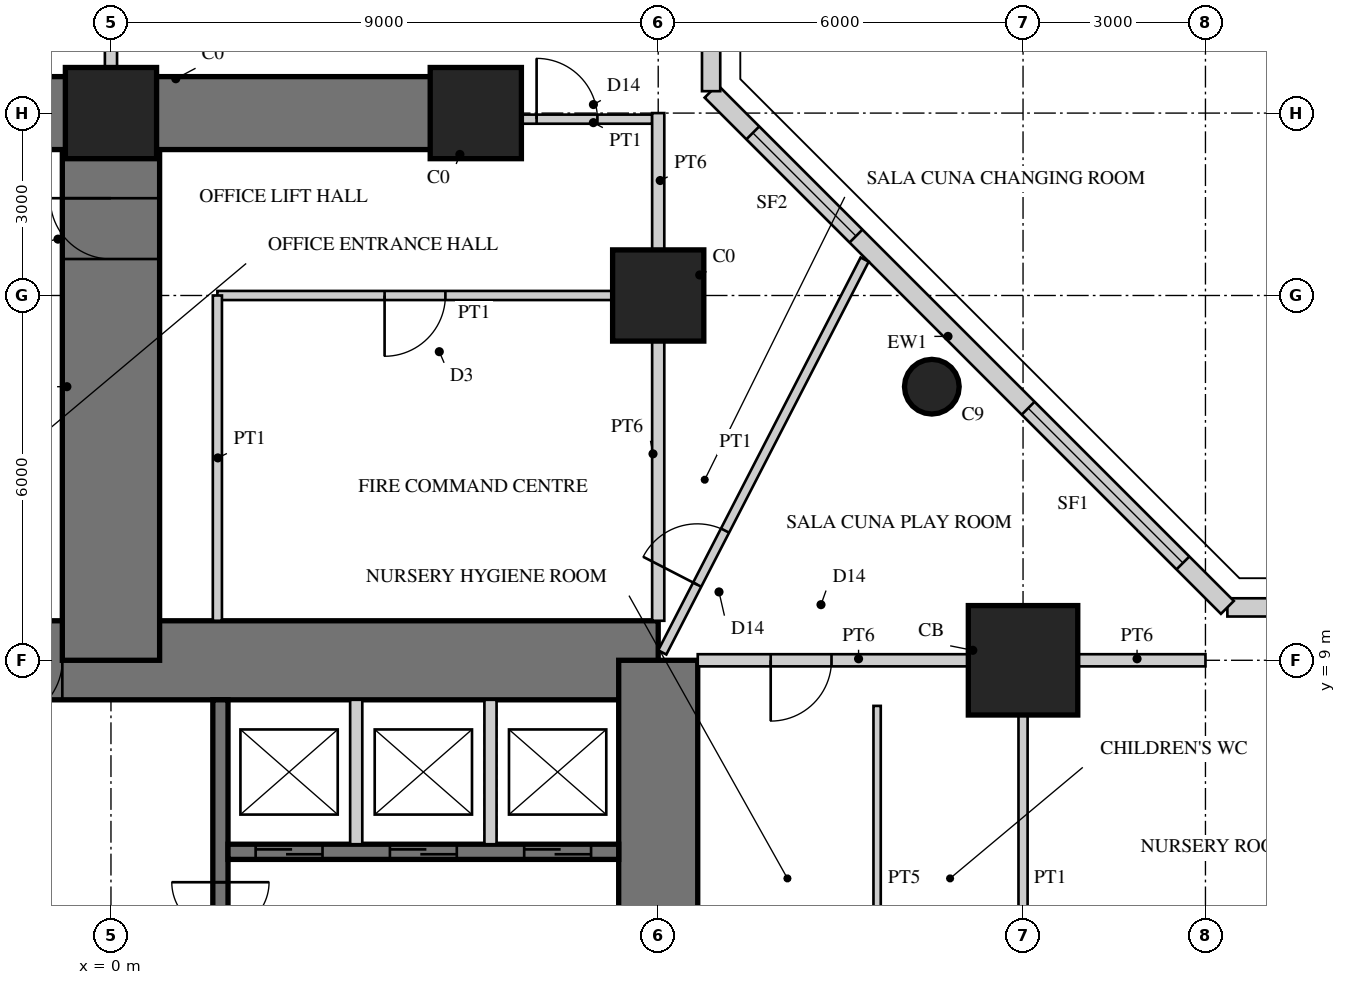
"""IFC4 building model, lengths in metres.
Left out: names, types, materials, properties, quantities, classifications, styles, units other than length and angle.
Written with IfcOpenShell. Run it as: python <this file> out.ifc"""

import sys

from ifc_helpers import new_model, si_unit, direction, frame, frame_2d, origin, origin_2d, place, context, subcontext, project, spatial, rectangle, hollow_rectangle, circle, extrude, element, fill, save


model = new_model("IFC4")
c1 = context("Model", 3, precision=1e-05, world=origin(), true_north=direction((0.0, 1.0)))
c2 = subcontext(c1, "Body", "Model", "MODEL_VIEW")
j1 = project(units=[si_unit("LENGTHUNIT", "METRE"), si_unit("PLANEANGLEUNIT", "RADIAN")], contexts=[c1])
p1 = place(None, origin())
s1 = spatial("IfcSite", under=j1, at=p1, CompositionType="ELEMENT")
p2 = place(p1, origin())
s2 = spatial("IfcBuilding", under=s1, at=p2, CompositionType="ELEMENT")
p3 = place(p2, origin())
s3 = spatial("IfcBuildingStorey", under=s2, at=p3, CompositionType="ELEMENT", Elevation=0.0)
p4 = place(p3, frame((9.0, 9.0, 0.0), z_axis=(0.0, 0.0, 1.0), x_axis=(-1.0, 0.0, 0.0)))
e1 = element("IfcWall", 1, at=p4, inside=s3, PredefinedType="SHEAR", context=c2, shape_type="SweptSolid", body=[
    extrude(rectangle(XDim=18.0, YDim=1.3, at=frame_2d((9.0, 0.0))), origin(), (0.0, 0.0, 1.0), 5.0),
])
p5 = place(p4, frame((9.8, 0.0, 0.0)))
e2 = element("IfcOpeningElement", 2, at=p5, cuts=e1, PredefinedType="OPENING", context=c2, shape_type="SweptSolid", body=[
    extrude(rectangle(XDim=1.0, YDim=2.4, at=frame_2d((0.5, 1.2))), frame((0.0, 0.66, 0.0), z_axis=(0.0, -1.0, 0.0), x_axis=(1.0, 0.0, 0.0)), (0.0, 0.0, 1.0), 1.32),
])
p6 = place(p3, frame((9.0, -9.0, 0.0), z_axis=(0.0, 0.0, 1.0), x_axis=(0.0, 1.0, 0.0)))
e3 = element("IfcWall", 3, at=p6, inside=s3, PredefinedType="SHEAR", context=c2, shape_type="SweptSolid", body=[
    extrude(rectangle(XDim=18.0, YDim=1.3, at=frame_2d((9.0, 0.0))), origin(), (0.0, 0.0, 1.0), 5.0),
])
p7 = place(p6, frame((9.8, 0.0, 0.0)))
e4 = element("IfcOpeningElement", 4, at=p7, cuts=e3, PredefinedType="OPENING", context=c2, shape_type="SweptSolid", body=[
    extrude(rectangle(XDim=1.0, YDim=2.4, at=frame_2d((0.5, 1.2))), frame((0.0, 0.66, 0.0), z_axis=(0.0, -1.0, 0.0), x_axis=(1.0, 0.0, 0.0)), (0.0, 0.0, 1.0), 1.32),
])
p8 = place(p3, frame((1.8, 1.875, 0.0), z_axis=(0.0, 0.0, 1.0), x_axis=(0.0, 1.0, 0.0)))
e5 = element("IfcWall", 5, at=p8, inside=s3, PredefinedType="SHEAR", context=c2, shape_type="SweptSolid", body=[
    extrude(rectangle(XDim=6.475, YDim=0.25, at=frame_2d((3.238, 0.0))), origin(), (0.0, 0.0, 1.0), 5.0),
])
p9 = place(p8, frame((1.875, 0.0, 0.0)))
e6 = element("IfcOpeningElement", 6, at=p9, cuts=e5, PredefinedType="OPENING", context=c2, shape_type="SweptSolid", body=[
    extrude(rectangle(XDim=1.6, YDim=2.4, at=frame_2d((0.8, 1.2))), frame((0.0, 0.135, 0.0), z_axis=(0.0, -1.0, 0.0), x_axis=(1.0, 0.0, 0.0)), (0.0, 0.0, 1.0), 0.27),
])
p10 = place(p3, frame((1.925, 5.85, 0.0), z_axis=(0.0, 0.0, 1.0), x_axis=(1.0, 0.0, 0.0)))
e7 = element("IfcWall", 7, at=p10, inside=s3, PredefinedType="SHEAR", context=c2, shape_type="SweptSolid", body=[
    extrude(rectangle(XDim=6.425, YDim=0.25, at=frame_2d((3.212, 0.0))), origin(), (0.0, 0.0, 1.0), 5.0),
])
p11 = place(p10, frame((0.454, 0.0, 0.0)))
e8 = element("IfcOpeningElement", 8, at=p11, cuts=e7, PredefinedType="OPENING", context=c2, shape_type="SweptSolid", body=[
    extrude(rectangle(XDim=1.1, YDim=2.2, at=frame_2d((0.55, 1.1))), frame((0.0, 0.135, 0.0), z_axis=(0.0, -1.0, 0.0), x_axis=(1.0, 0.0, 0.0)), (0.0, 0.0, 1.0), 0.27),
])
p12 = place(p10, frame((2.663, 0.0, 0.0)))
e9 = element("IfcOpeningElement", 9, at=p12, cuts=e7, PredefinedType="OPENING", context=c2, shape_type="SweptSolid", body=[
    extrude(rectangle(XDim=1.1, YDim=2.2, at=frame_2d((0.55, 1.1))), frame((0.0, 0.135, 0.0), z_axis=(0.0, -1.0, 0.0), x_axis=(1.0, 0.0, 0.0)), (0.0, 0.0, 1.0), 0.27),
])
p13 = place(p10, frame((4.871, 0.0, 0.0)))
e10 = element("IfcOpeningElement", 10, at=p13, cuts=e7, PredefinedType="OPENING", context=c2, shape_type="SweptSolid", body=[
    extrude(rectangle(XDim=1.1, YDim=2.2, at=frame_2d((0.55, 1.1))), frame((0.0, 0.135, 0.0), z_axis=(0.0, -1.0, 0.0), x_axis=(1.0, 0.0, 0.0)), (0.0, 0.0, 1.0), 0.27),
])
for number, where, z_axis, x_axis in (
    (11, (4.033, 5.975, 0.0), (0.0, 0.0, 1.0), (0.0, 1.0, 0.0)),
    (12, (6.242, 5.975, 0.0), (0.0, 0.0, 1.0), (0.0, 1.0, 0.0)),
):
    element("IfcWall", number, at=place(p3, frame(where, z_axis=z_axis, x_axis=x_axis)), inside=s3, PredefinedType="PARTITIONING", context=c2, shape_type="SweptSolid", body=[
        extrude(rectangle(XDim=2.375, YDim=0.2, at=frame_2d((1.188, 0.0))), origin(), (0.0, 0.0, 1.0), 5.0),
    ])
p14 = place(p3, frame((0.0, 9.0, 0.0), z_axis=(0.0, 0.0, 1.0), x_axis=(0.0, 1.0, 0.0)))
e13 = element("IfcWall", 13, at=p14, inside=s3, PredefinedType="SHEAR", context=c2, shape_type="SweptSolid", body=[
    extrude(rectangle(XDim=9.0, YDim=1.6, at=frame_2d((4.5, 0.0))), origin(), (0.0, 0.0, 1.0), 5.0),
])
p15 = place(p14, frame((6.6, 0.0, 0.0)))
e14 = element("IfcOpeningElement", 14, at=p15, cuts=e13, PredefinedType="OPENING", context=c2, shape_type="SweptSolid", body=[
    extrude(rectangle(XDim=1.0, YDim=2.2, at=frame_2d((0.5, 1.1))), frame((0.0, 0.81, 0.0), z_axis=(0.0, -1.0, 0.0), x_axis=(1.0, 0.0, 0.0)), (0.0, 0.0, 1.0), 1.62),
])
for number, where, z_axis, x_axis in (
    (15, (0.0, 18.0, 0.0), (0.0, 0.0, 1.0), (-1.0, 0.0, 0.0)),
    (16, (0.0, 18.0, 0.0), (0.0, 0.0, 1.0), (1.0, 0.0, 0.0)),
):
    element("IfcWall", number, at=place(p3, frame(where, z_axis=z_axis, x_axis=x_axis)), inside=s3, PredefinedType="SHEAR", context=c2, shape_type="SweptSolid", body=[
        extrude(rectangle(XDim=6.0, YDim=1.2, at=frame_2d((3.0, 0.0))), origin(), (0.0, 0.0, 1.0), 5.0),
    ])
p16 = place(p3, frame((9.0, 15.0, 0.0), z_axis=(0.0, 0.0, 1.0), x_axis=(1.0, 0.0, 0.0)))
e17 = element("IfcColumn", 17, at=p16, inside=s3, PredefinedType="COLUMN", context=c2, shape_type="SweptSolid", body=[
    extrude(rectangle(XDim=1.5, YDim=1.5, at=origin_2d()), origin(), (0.0, 0.0, 1.0), 5.0),
])
p17 = place(p3, frame((15.0, 9.0, 0.0), z_axis=(0.0, 0.0, 1.0), x_axis=(1.0, 0.0, 0.0)))
e18 = element("IfcColumn", 18, at=p17, inside=s3, PredefinedType="COLUMN", context=c2, shape_type="SweptSolid", body=[
    extrude(rectangle(XDim=1.8, YDim=1.8, at=origin_2d()), origin(), (0.0, 0.0, 1.0), 5.0),
])
for number, where, z_axis, x_axis in (
    (19, (6.0, 18.0, 0.0), (0.0, 0.0, 1.0), (1.0, 0.0, 0.0)),
    (20, (0.0, 18.0, 0.0), (0.0, 0.0, 1.0), (1.0, 0.0, 0.0)),
):
    element("IfcColumn", number, at=place(p3, frame(where, z_axis=z_axis, x_axis=x_axis)), inside=s3, PredefinedType="COLUMN", context=c2, shape_type="SweptSolid", body=[
        extrude(rectangle(XDim=1.5, YDim=1.5, at=origin_2d()), origin(), (0.0, 0.0, 1.0), 5.0),
    ])
p18 = place(p3, frame((13.5, 13.5, 0.0), z_axis=(0.0, 0.0, 1.0), x_axis=(1.0, 0.0, 0.0)))
e21 = element("IfcColumn", 21, at=p18, inside=s3, PredefinedType="COLUMN", context=c2, shape_type="SweptSolid", body=[
    extrude(circle(Radius=0.45, at=origin_2d()), origin(), (0.0, 0.0, 1.0), 5.0),
])
p19 = place(p3, frame((24.36, 9.87, 0.0), z_axis=(0.0, 0.0, 1.0), x_axis=(-1.0, 0.0, 0.0)))
e22 = element("IfcWall", 22, at=p19, inside=s3, PredefinedType="SOLIDWALL", context=c2, shape_type="SweptSolid", body=[
    extrude(rectangle(XDim=6.0, YDim=0.3, at=frame_2d((3.0, 0.0))), origin(), (0.0, 0.0, 1.0), 4.8),
])
p20 = place(p19, frame((1.635, 0.0, 0.3)))
e23 = element("IfcOpeningElement", 23, at=p20, cuts=e22, PredefinedType="OPENING", context=c2, shape_type="SweptSolid", body=[
    extrude(rectangle(XDim=1.2, YDim=3.9, at=frame_2d((0.6, 1.95))), frame((0.0, 0.16, 0.0), z_axis=(0.0, -1.0, 0.0), x_axis=(1.0, 0.0, 0.0)), (0.0, 0.0, 1.0), 0.32),
])
p21 = place(p19, frame((3.93, 0.0, 0.3)))
e24 = element("IfcOpeningElement", 24, at=p21, cuts=e22, PredefinedType="OPENING", context=c2, shape_type="SweptSolid", body=[
    extrude(rectangle(XDim=1.2, YDim=3.9, at=frame_2d((0.6, 1.95))), frame((0.0, 0.16, 0.0), z_axis=(0.0, -1.0, 0.0), x_axis=(1.0, 0.0, 0.0)), (0.0, 0.0, 1.0), 0.32),
])
p22 = place(p3, frame((18.36, 9.87, 0.0), z_axis=(0.0, 0.0, 1.0), x_axis=(-0.707106781187, 0.707106781187, 0.0)))
e25 = element("IfcWall", 25, at=p22, inside=s3, PredefinedType="SOLIDWALL", context=c2, shape_type="SweptSolid", body=[
    extrude(rectangle(XDim=12.007, YDim=0.3, at=frame_2d((6.003, 0.0))), origin(), (0.0, 0.0, 1.0), 4.8),
])
p23 = place(p22, frame((1.034, 0.0, 0.3)))
e26 = element("IfcOpeningElement", 26, at=p23, cuts=e25, PredefinedType="OPENING", context=c2, shape_type="SweptSolid", body=[
    extrude(rectangle(XDim=3.6, YDim=3.9, at=frame_2d((1.8, 1.95))), frame((0.0, 0.16, 0.0), z_axis=(0.0, -1.0, 0.0), x_axis=(1.0, 0.0, 0.0)), (0.0, 0.0, 1.0), 0.32),
])
p24 = place(p22, frame((8.637, 0.0, 0.3)))
e27 = element("IfcOpeningElement", 27, at=p24, cuts=e25, PredefinedType="OPENING", context=c2, shape_type="SweptSolid", body=[
    extrude(rectangle(XDim=2.4, YDim=3.9, at=frame_2d((1.2, 1.95))), frame((0.0, 0.16, 0.0), z_axis=(0.0, -1.0, 0.0), x_axis=(1.0, 0.0, 0.0)), (0.0, 0.0, 1.0), 0.32),
])
p25 = place(p3, frame((9.87, 18.36, 0.0), z_axis=(0.0, 0.0, 1.0), x_axis=(0.0, 1.0, 0.0)))
e28 = element("IfcWall", 28, at=p25, inside=s3, PredefinedType="SOLIDWALL", context=c2, shape_type="SweptSolid", body=[
    extrude(rectangle(XDim=6.0, YDim=0.3, at=frame_2d((3.0, 0.0))), origin(), (0.0, 0.0, 1.0), 4.8),
])
p26 = place(p25, frame((1.69, 0.0, 0.3)))
e29 = element("IfcOpeningElement", 29, at=p26, cuts=e28, PredefinedType="OPENING", context=c2, shape_type="SweptSolid", body=[
    extrude(rectangle(XDim=2.4, YDim=3.9, at=frame_2d((1.2, 1.95))), frame((0.0, 0.16, 0.0), z_axis=(0.0, -1.0, 0.0), x_axis=(1.0, 0.0, 0.0)), (0.0, 0.0, 1.0), 0.32),
])
p27 = place(p3, frame((8.25, 15.0, 0.0), z_axis=(0.0, 0.0, 1.0), x_axis=(-1.0, 0.0, 0.0)))
e30 = element("IfcWall", 30, at=p27, inside=s3, PredefinedType="PARTITIONING", context=c2, shape_type="SweptSolid", body=[
    extrude(rectangle(XDim=6.5, YDim=0.15, at=frame_2d((3.25, 0.0))), origin(), (0.0, 0.0, 1.0), 3.85),
])
p28 = place(p27, frame((2.75, 0.0, 0.0)))
e31 = element("IfcOpeningElement", 31, at=p28, cuts=e30, PredefinedType="OPENING", context=c2, shape_type="SweptSolid", body=[
    extrude(rectangle(XDim=1.0, YDim=2.1, at=frame_2d((0.5, 1.05))), frame((0.0, 0.085, 0.0), z_axis=(0.0, -1.0, 0.0), x_axis=(1.0, 0.0, 0.0)), (0.0, 0.0, 1.0), 0.17),
])
p29 = place(p3, frame((1.75, 9.65, 0.0), z_axis=(0.0, 0.0, 1.0), x_axis=(0.0, 1.0, 0.0)))
e32 = element("IfcWall", 32, at=p29, inside=s3, PredefinedType="PARTITIONING", context=c2, shape_type="SweptSolid", body=[
    extrude(rectangle(XDim=5.35, YDim=0.15, at=frame_2d((2.675, 0.0))), origin(), (0.0, 0.0, 1.0), 4.8),
])
p30 = place(p3, frame((6.75, 17.9, 0.0), z_axis=(0.0, 0.0, 1.0), x_axis=(1.0, 0.0, 0.0)))
e33 = element("IfcWall", 33, at=p30, inside=s3, PredefinedType="PARTITIONING", context=c2, shape_type="SweptSolid", body=[
    extrude(rectangle(XDim=2.15, YDim=0.15, at=frame_2d((1.075, 0.0))), origin(), (0.0, 0.0, 1.0), 3.85),
])
p31 = place(p30, frame((0.25, 0.0, 0.0)))
e34 = element("IfcOpeningElement", 34, at=p31, cuts=e33, PredefinedType="OPENING", context=c2, shape_type="SweptSolid", body=[
    extrude(rectangle(XDim=1.0, YDim=2.2, at=frame_2d((0.5, 1.1))), frame((0.0, 0.085, 0.0), z_axis=(0.0, -1.0, 0.0), x_axis=(1.0, 0.0, 0.0)), (0.0, 0.0, 1.0), 0.17),
])
p32 = place(p3, frame((15.0, 2.575, 0.0), z_axis=(0.0, 0.0, 1.0), x_axis=(0.0, 1.0, 0.0)))
e35 = element("IfcWall", 35, at=p32, inside=s3, PredefinedType="PARTITIONING", context=c2, shape_type="SweptSolid", body=[
    extrude(rectangle(XDim=5.675, YDim=0.15, at=frame_2d((2.837, 0.0))), origin(), (0.0, 0.0, 1.0), 3.85),
])
p33 = place(p3, frame((12.6, 2.575, 0.0), z_axis=(0.0, 0.0, 1.0), x_axis=(0.0, 1.0, 0.0)))
e36 = element("IfcWall", 36, at=p33, inside=s3, PredefinedType="PLUMBINGWALL", context=c2, shape_type="SweptSolid", body=[
    extrude(rectangle(XDim=5.675, YDim=0.12, at=frame_2d((2.837, 0.0))), origin(), (0.0, 0.0, 1.0), 4.8),
])
p34 = place(p3, frame((9.067, 9.129, 0.0), z_axis=(0.0, 0.0, 1.0), x_axis=(0.457956589674, 0.888974556427, 0.0)))
e37 = element("IfcWall", 37, at=p34, inside=s3, PredefinedType="PARTITIONING", context=c2, shape_type="SweptSolid", body=[
    extrude(rectangle(XDim=7.268, YDim=0.15, at=frame_2d((3.634, 0.0))), origin(), (0.0, 0.0, 1.0), 4.8),
])
p35 = place(p34, frame((1.254, 0.0, 0.0)))
e38 = element("IfcOpeningElement", 38, at=p35, cuts=e37, PredefinedType="OPENING", context=c2, shape_type="SweptSolid", body=[
    extrude(rectangle(XDim=1.0, YDim=2.2, at=frame_2d((0.5, 1.1))), frame((0.0, 0.085, 0.0), z_axis=(0.0, -1.0, 0.0), x_axis=(1.0, 0.0, 0.0)), (0.0, 0.0, 1.0), 0.17),
])
p36 = place(p3, frame((9.65, 9.0, 0.0), z_axis=(0.0, 0.0, 1.0), x_axis=(1.0, 0.0, 0.0)))
e39 = element("IfcWall", 39, at=p36, inside=s3, PredefinedType="SOLIDWALL", context=c2, shape_type="SweptSolid", body=[
    extrude(rectangle(XDim=4.6, YDim=0.2, at=frame_2d((2.3, 0.0))), origin(), (0.0, 0.0, 1.0), 3.8),
])
p37 = place(p36, frame((1.2, 0.0, 0.0)))
e40 = element("IfcOpeningElement", 40, at=p37, cuts=e39, PredefinedType="OPENING", context=c2, shape_type="SweptSolid", body=[
    extrude(rectangle(XDim=1.0, YDim=2.2, at=frame_2d((0.5, 1.1))), frame((0.0, 0.11, 0.0), z_axis=(0.0, -1.0, 0.0), x_axis=(1.0, 0.0, 0.0)), (0.0, 0.0, 1.0), 0.22),
])
p38 = place(p3, frame((15.75, 9.0, 0.0), z_axis=(0.0, 0.0, 1.0), x_axis=(1.0, 0.0, 0.0)))
e41 = element("IfcWall", 41, at=p38, inside=s3, PredefinedType="SOLIDWALL", context=c2, shape_type="SweptSolid", body=[
    extrude(rectangle(XDim=2.25, YDim=0.2, at=frame_2d((1.125, 0.0))), origin(), (0.0, 0.0, 1.0), 3.8),
])
p39 = place(p3, frame((9.0, 14.25, 0.0), z_axis=(0.0, 0.0, 1.0), x_axis=(0.0, -1.0, 0.0)))
e42 = element("IfcWall", 42, at=p39, inside=s3, PredefinedType="SOLIDWALL", context=c2, shape_type="SweptSolid", body=[
    extrude(rectangle(XDim=4.6, YDim=0.2, at=frame_2d((2.3, 0.0))), origin(), (0.0, 0.0, 1.0), 3.8),
])
p40 = place(p3, frame((9.0, 18.0, 0.0), z_axis=(0.0, 0.0, 1.0), x_axis=(0.0, -1.0, 0.0)))
e43 = element("IfcWall", 43, at=p40, inside=s3, PredefinedType="SOLIDWALL", context=c2, shape_type="SweptSolid", body=[
    extrude(rectangle(XDim=2.25, YDim=0.2, at=frame_2d((1.125, 0.0))), origin(), (0.0, 0.0, 1.0), 3.8),
])
p41 = place(p3, frame((0.0, 18.0, 0.0), z_axis=(0.0, 0.0, 1.0), x_axis=(0.0, 1.0, 0.0)))
e44 = element("IfcWall", 44, at=p41, inside=s3, PredefinedType="SOLIDWALL", context=c2, shape_type="SweptSolid", body=[
    extrude(rectangle(XDim=3.0, YDim=0.2, at=frame_2d((1.5, 0.0))), origin(), (0.0, 0.0, 1.0), 4.8),
])
p42 = place(p41, frame((1.05, 0.0, 0.0)))
e45 = element("IfcOpeningElement", 45, at=p42, cuts=e44, PredefinedType="OPENING", context=c2, shape_type="SweptSolid", body=[
    extrude(rectangle(XDim=1.0, YDim=2.2, at=frame_2d((0.5, 1.1))), frame((0.0, 0.11, 0.0), z_axis=(0.0, -1.0, 0.0), x_axis=(1.0, 0.0, 0.0)), (0.0, 0.0, 1.0), 0.22),
])
p43 = place(p23, origin())
e46 = element("IfcWindow", 46, at=p43, inside=s3, PartitioningType="SINGLE_PANEL", PredefinedType="WINDOW", context=c2, shape_type="SweptSolid", body=[
    extrude(hollow_rectangle(XDim=3.6, YDim=3.9, WallThickness=0.06, at=frame_2d((1.8, 1.95))), frame((0.0, 0.03, 0.0), z_axis=(0.0, -1.0, 0.0), x_axis=(1.0, 0.0, 0.0)), (0.0, 0.0, 1.0), 0.06),
    extrude(rectangle(XDim=3.479, YDim=3.779, at=frame_2d((1.8, 1.95))), frame((0.0, 0.03, 0.0), z_axis=(0.0, -1.0, 0.0), x_axis=(1.0, 0.0, 0.0)), (0.0, 0.0, 1.0), 0.06),
])
fill(e26, e46)
p44 = place(p24, origin())
e47 = element("IfcWindow", 47, at=p44, inside=s3, PartitioningType="SINGLE_PANEL", PredefinedType="WINDOW", context=c2, shape_type="SweptSolid", body=[
    extrude(hollow_rectangle(XDim=2.4, YDim=3.9, WallThickness=0.06, at=frame_2d((1.2, 1.95))), frame((0.0, 0.03, 0.0), z_axis=(0.0, -1.0, 0.0), x_axis=(1.0, 0.0, 0.0)), (0.0, 0.0, 1.0), 0.06),
    extrude(rectangle(XDim=2.279, YDim=3.779, at=frame_2d((1.2, 1.95))), frame((0.0, 0.03, 0.0), z_axis=(0.0, -1.0, 0.0), x_axis=(1.0, 0.0, 0.0)), (0.0, 0.0, 1.0), 0.06),
])
fill(e27, e47)
p45 = place(p28, origin())
e48 = element("IfcDoor", 48, at=p45, inside=s3, OperationType="SINGLE_SWING_RIGHT", PredefinedType="DOOR", context=c2, shape_type="SweptSolid", body=[
    extrude(rectangle(XDim=1.0, YDim=2.1, at=frame_2d((0.5, 1.05))), frame((0.0, 0.025, 0.0), z_axis=(0.0, -1.0, 0.0), x_axis=(1.0, 0.0, 0.0)), (0.0, 0.0, 1.0), 0.05),
])
fill(e31, e48)
p46 = place(p31, origin())
e49 = element("IfcDoor", 49, at=p46, inside=s3, OperationType="SINGLE_SWING_LEFT", PredefinedType="DOOR", context=c2, shape_type="SweptSolid", body=[
    extrude(rectangle(XDim=1.0, YDim=2.2, at=frame_2d((0.5, 1.1))), frame((0.0, 0.025, 0.0), z_axis=(0.0, -1.0, 0.0), x_axis=(1.0, 0.0, 0.0)), (0.0, 0.0, 1.0), 0.05),
])
fill(e34, e49)
p47 = place(p35, origin())
e50 = element("IfcDoor", 50, at=p47, inside=s3, OperationType="SINGLE_SWING_LEFT", PredefinedType="DOOR", context=c2, shape_type="SweptSolid", body=[
    extrude(rectangle(XDim=1.0, YDim=2.2, at=frame_2d((0.5, 1.1))), frame((0.0, 0.025, 0.0), z_axis=(0.0, -1.0, 0.0), x_axis=(1.0, 0.0, 0.0)), (0.0, 0.0, 1.0), 0.05),
])
fill(e38, e50)
p48 = place(p37, frame((1.0, 0.0, 0.0), z_axis=(0.0, 0.0, 1.0), x_axis=(-1.0, 0.0, 0.0)))
e51 = element("IfcDoor", 51, at=p48, inside=s3, OperationType="SINGLE_SWING_RIGHT", PredefinedType="DOOR", context=c2, shape_type="SweptSolid", body=[
    extrude(rectangle(XDim=1.0, YDim=2.2, at=frame_2d((0.5, 1.1))), frame((0.0, 0.025, 0.0), z_axis=(0.0, -1.0, 0.0), x_axis=(1.0, 0.0, 0.0)), (0.0, 0.0, 1.0), 0.05),
])
fill(e40, e51)
p49 = place(p15, origin())
e52 = element("IfcDoor", 52, at=p49, inside=s3, OperationType="SINGLE_SWING_RIGHT", PredefinedType="DOOR", context=c2, shape_type="SweptSolid", body=[
    extrude(rectangle(XDim=1.0, YDim=2.2, at=frame_2d((0.5, 1.1))), frame((0.0, 0.025, 0.0), z_axis=(0.0, -1.0, 0.0), x_axis=(1.0, 0.0, 0.0)), (0.0, 0.0, 1.0), 0.05),
])
fill(e14, e52)
p50 = place(p5, origin())
e53 = element("IfcDoor", 53, at=p50, inside=s3, OperationType="SINGLE_SWING_RIGHT", PredefinedType="DOOR", context=c2, shape_type="SweptSolid", body=[
    extrude(rectangle(XDim=1.0, YDim=2.4, at=frame_2d((0.5, 1.2))), frame((0.0, 0.055, 0.0), z_axis=(0.0, -1.0, 0.0), x_axis=(1.0, 0.0, 0.0)), (0.0, 0.0, 1.0), 0.05),
])
fill(e2, e53)
p51 = place(p11, origin())
e54 = element("IfcDoor", 54, at=p51, inside=s3, OperationType="DOUBLE_DOOR_SLIDING", PredefinedType="DOOR", context=c2, shape_type="SweptSolid", body=[
    extrude(rectangle(XDim=1.1, YDim=2.2, at=frame_2d((0.55, 1.1))), frame((0.0, 0.025, 0.0), z_axis=(0.0, -1.0, 0.0), x_axis=(1.0, 0.0, 0.0)), (0.0, 0.0, 1.0), 0.05),
])
fill(e8, e54)
p52 = place(p12, origin())
e55 = element("IfcDoor", 55, at=p52, inside=s3, OperationType="DOUBLE_DOOR_SLIDING", PredefinedType="DOOR", context=c2, shape_type="SweptSolid", body=[
    extrude(rectangle(XDim=1.1, YDim=2.2, at=frame_2d((0.55, 1.1))), frame((0.0, 0.025, 0.0), z_axis=(0.0, -1.0, 0.0), x_axis=(1.0, 0.0, 0.0)), (0.0, 0.0, 1.0), 0.05),
])
fill(e9, e55)
p53 = place(p13, origin())
e56 = element("IfcDoor", 56, at=p53, inside=s3, OperationType="DOUBLE_DOOR_SLIDING", PredefinedType="DOOR", context=c2, shape_type="SweptSolid", body=[
    extrude(rectangle(XDim=1.1, YDim=2.2, at=frame_2d((0.55, 1.1))), frame((0.0, 0.025, 0.0), z_axis=(0.0, -1.0, 0.0), x_axis=(1.0, 0.0, 0.0)), (0.0, 0.0, 1.0), 0.05),
])
fill(e10, e56)
p54 = place(p9, origin())
e57 = element("IfcDoor", 57, at=p54, inside=s3, OperationType="DOUBLE_DOOR_DOUBLE_SWING", PredefinedType="DOOR", context=c2, shape_type="SweptSolid", body=[
    extrude(rectangle(XDim=1.6, YDim=2.4, at=frame_2d((0.8, 1.2))), frame((0.0, 0.025, 0.0), z_axis=(0.0, -1.0, 0.0), x_axis=(1.0, 0.0, 0.0)), (0.0, 0.0, 1.0), 0.05),
])
fill(e6, e57)
save(model, sys.argv[1])
